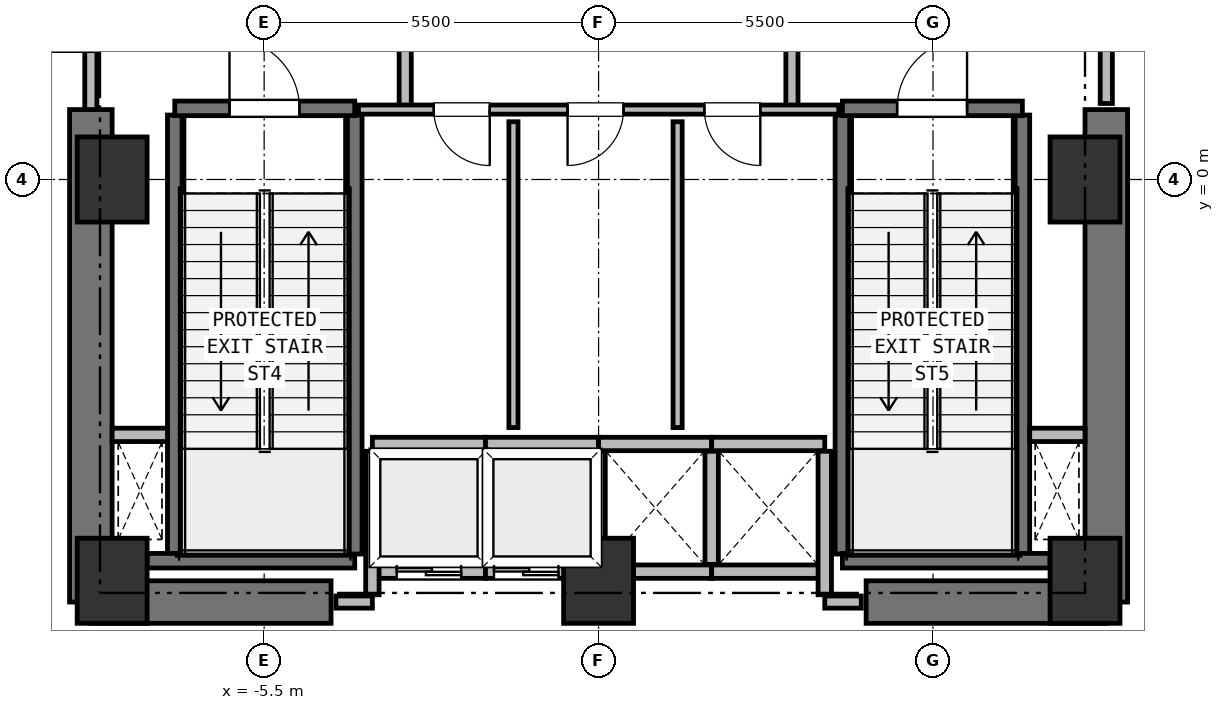
"""IFC4 building model, lengths in metres.
Left out: names, types, materials, properties, quantities, classifications, styles, units other than length and angle.
Written with IfcOpenShell. Run it as: python <this file> out.ifc"""

import sys

from ifc_helpers import new_model, si_unit, direction, frame, frame_2d, origin, origin_2d, place, context, subcontext, project, spatial, rectangle, extrude, element, fill, save


model = new_model("IFC4")
c1 = context("Model", 3, precision=1e-05, world=origin(), true_north=direction((0.0, 1.0)))
c2 = subcontext(c1, "Body", "Model", "MODEL_VIEW")
j1 = project(units=[si_unit("LENGTHUNIT", "METRE"), si_unit("PLANEANGLEUNIT", "RADIAN")], contexts=[c1])
p1 = place(None, origin())
s1 = spatial("IfcSite", under=j1, at=p1, CompositionType="ELEMENT")
p2 = place(p1, origin())
s2 = spatial("IfcBuilding", under=s1, at=p2, CompositionType="ELEMENT")
p3 = place(p2, frame((0.0, 0.0, 16.0)))
s3 = spatial("IfcBuildingStorey", under=s2, at=p3, CompositionType="ELEMENT", Elevation=16.0)
for number, where, z_axis, x_axis in (
    (1, (-8.0, -6.6, 0.0), (0.0, 0.0, 1.0), (1.0, 0.0, 0.0)),
    (2, (0.0, -6.6, 0.0), (0.0, 0.0, 1.0), (1.0, 0.0, 0.0)),
    (3, (8.0, -6.6, 0.0), (0.0, 0.0, 1.0), (1.0, 0.0, 0.0)),
    (4, (8.0, 0.0, 0.0), (0.0, 0.0, 1.0), (1.0, 0.0, 0.0)),
    (5, (-8.0, 0.0, 0.0), (0.0, 0.0, 1.0), (1.0, 0.0, 0.0)),
):
    element("IfcColumn", number, at=place(p3, frame(where, z_axis=z_axis, x_axis=x_axis)), inside=s3, PredefinedType="COLUMN", context=c2, shape_type="SweptSolid", body=[
        extrude(rectangle(XDim=1.15, YDim=1.4, at=origin_2d()), origin(), (0.0, 0.0, 1.0), 5.5),
    ])
for number, where, z_axis, x_axis in (
    (6, (-8.35, -6.95, 0.0), (0.0, 0.0, 1.0), (1.0, 0.0, 0.0)),
    (7, (4.4, -6.95, 0.0), (0.0, 0.0, 1.0), (1.0, 0.0, 0.0)),
):
    element("IfcWall", number, at=place(p3, frame(where, z_axis=z_axis, x_axis=x_axis)), inside=s3, PredefinedType="SHEAR", context=c2, shape_type="SweptSolid", body=[
        extrude(rectangle(XDim=3.95, YDim=0.7, at=frame_2d((1.975, 0.0))), origin(), (0.0, 0.0, 1.0), 5.22),
    ])
for number, where, z_axis, x_axis in (
    (8, (-8.35, -6.95, 0.0), (0.0, 0.0, 1.0), (0.0, 1.0, 0.0)),
    (9, (8.35, -6.95, 0.0), (0.0, 0.0, 1.0), (0.0, 1.0, 0.0)),
):
    element("IfcWall", number, at=place(p3, frame(where, z_axis=z_axis, x_axis=x_axis)), inside=s3, PredefinedType="SHEAR", context=c2, shape_type="SweptSolid", body=[
        extrude(rectangle(XDim=8.1, YDim=0.7, at=frame_2d((4.05, 0.0))), origin(), (0.0, 0.0, 1.0), 5.22),
    ])
p4 = place(p3, frame((-6.97, -6.16, 0.0), z_axis=(0.0, 0.0, 1.0), x_axis=(0.0, 1.0, 0.0)))
e10 = element("IfcWall", 10, at=p4, inside=s3, PredefinedType="SHEAR", context=c2, shape_type="SweptSolid", body=[
    extrude(rectangle(XDim=7.22, YDim=0.24, at=frame_2d((3.61, 0.0))), origin(), (0.0, 0.0, 1.0), 5.22),
])
p5 = place(p3, frame((-7.425, -6.27, 0.0), z_axis=(0.0, 0.0, 1.0), x_axis=(1.0, 0.0, 0.0)))
e11 = element("IfcWall", 11, at=p5, inside=s3, PredefinedType="SHEAR", context=c2, shape_type="SweptSolid", body=[
    extrude(rectangle(XDim=3.415, YDim=0.24, at=frame_2d((1.708, 0.0))), origin(), (0.0, 0.0, 1.0), 5.22),
])
p6 = place(p3, frame((-4.01, -6.16, 0.0), z_axis=(0.0, 0.0, 1.0), x_axis=(0.0, 1.0, 0.0)))
e12 = element("IfcWall", 12, at=p6, inside=s3, PredefinedType="SHEAR", context=c2, shape_type="SweptSolid", body=[
    extrude(rectangle(XDim=7.22, YDim=0.24, at=frame_2d((3.61, 0.0))), origin(), (0.0, 0.0, 1.0), 5.22),
])
p7 = place(p3, frame((-6.97, 1.17, 0.0), z_axis=(0.0, 0.0, 1.0), x_axis=(1.0, 0.0, 0.0)))
e13 = element("IfcWall", 13, at=p7, inside=s3, PredefinedType="SHEAR", context=c2, shape_type="SweptSolid", body=[
    extrude(rectangle(XDim=2.96, YDim=0.24, at=frame_2d((1.48, 0.0))), origin(), (0.0, 0.0, 1.0), 5.22),
])
p8 = place(p7, frame((0.9, 0.0, 0.0)))
e14 = element("IfcOpeningElement", 14, at=p8, cuts=e13, PredefinedType="OPENING", context=c2, shape_type="SweptSolid", body=[
    extrude(rectangle(XDim=1.15, YDim=2.15, at=frame_2d((0.575, 1.075))), frame((0.0, 0.13, 0.0), z_axis=(0.0, -1.0, 0.0), x_axis=(1.0, 0.0, 0.0)), (0.0, 0.0, 1.0), 0.26),
])
for number, where, z_axis, x_axis in (
    (15, (4.01, -6.16, 0.0), (0.0, 0.0, 1.0), (0.0, 1.0, 0.0)),
    (16, (6.97, -6.16, 0.0), (0.0, 0.0, 1.0), (0.0, 1.0, 0.0)),
):
    element("IfcWall", number, at=place(p3, frame(where, z_axis=z_axis, x_axis=x_axis)), inside=s3, PredefinedType="SHEAR", context=c2, shape_type="SweptSolid", body=[
        extrude(rectangle(XDim=7.22, YDim=0.24, at=frame_2d((3.61, 0.0))), origin(), (0.0, 0.0, 1.0), 5.22),
    ])
p9 = place(p3, frame((4.01, -6.27, 0.0), z_axis=(0.0, 0.0, 1.0), x_axis=(1.0, 0.0, 0.0)))
e17 = element("IfcWall", 17, at=p9, inside=s3, PredefinedType="SHEAR", context=c2, shape_type="SweptSolid", body=[
    extrude(rectangle(XDim=3.415, YDim=0.24, at=frame_2d((1.708, 0.0))), origin(), (0.0, 0.0, 1.0), 5.22),
])
p10 = place(p3, frame((4.01, 1.17, 0.0), z_axis=(0.0, 0.0, 1.0), x_axis=(1.0, 0.0, 0.0)))
e18 = element("IfcWall", 18, at=p10, inside=s3, PredefinedType="SHEAR", context=c2, shape_type="SweptSolid", body=[
    extrude(rectangle(XDim=2.96, YDim=0.24, at=frame_2d((1.48, 0.0))), origin(), (0.0, 0.0, 1.0), 5.22),
])
p11 = place(p10, frame((0.9, 0.0, 0.0)))
e19 = element("IfcOpeningElement", 19, at=p11, cuts=e18, PredefinedType="OPENING", context=c2, shape_type="SweptSolid", body=[
    extrude(rectangle(XDim=1.15, YDim=2.15, at=frame_2d((0.575, 1.075))), frame((0.0, 0.13, 0.0), z_axis=(0.0, -1.0, 0.0), x_axis=(1.0, 0.0, 0.0)), (0.0, 0.0, 1.0), 0.26),
])
for number, where, z_axis, x_axis in (
    (20, (-8.0, -4.2, 0.0), (0.0, 0.0, 1.0), (1.0, 0.0, 0.0)),
    (21, (7.09, -4.2, 0.0), (0.0, 0.0, 1.0), (1.0, 0.0, 0.0)),
):
    element("IfcWall", number, at=place(p3, frame(where, z_axis=z_axis, x_axis=x_axis)), inside=s3, PredefinedType="PARTITIONING", context=c2, shape_type="SweptSolid", body=[
        extrude(rectangle(XDim=0.91, YDim=0.22, at=frame_2d((0.455, 0.0))), origin(), (0.0, 0.0, 1.0), 5.22),
    ])
p12 = place(p3, frame((-3.72, -6.45, 0.0), z_axis=(0.0, 0.0, 1.0), x_axis=(1.0, 0.0, 0.0)))
e22 = element("IfcWall", 22, at=p12, inside=s3, PredefinedType="PARTITIONING", context=c2, shape_type="SweptSolid", body=[
    extrude(rectangle(XDim=1.86, YDim=0.22, at=frame_2d((0.93, 0.0))), origin(), (0.0, 0.0, 1.0), 4.8),
])
p13 = place(p12, frame((0.4, 0.0, 0.0)))
e23 = element("IfcOpeningElement", 23, at=p13, cuts=e22, PredefinedType="OPENING", context=c2, shape_type="SweptSolid", body=[
    extrude(rectangle(XDim=1.06, YDim=2.15, at=frame_2d((0.53, 1.075))), frame((0.0, 0.12, 0.0), z_axis=(0.0, -1.0, 0.0), x_axis=(1.0, 0.0, 0.0)), (0.0, 0.0, 1.0), 0.24),
])
p14 = place(p3, frame((-3.72, -4.35, 0.0), z_axis=(0.0, 0.0, 1.0), x_axis=(1.0, 0.0, 0.0)))
e24 = element("IfcWall", 24, at=p14, inside=s3, PredefinedType="PARTITIONING", context=c2, shape_type="SweptSolid", body=[
    extrude(rectangle(XDim=1.86, YDim=0.22, at=frame_2d((0.93, 0.0))), origin(), (0.0, 0.0, 1.0), 5.22),
])
p15 = place(p3, frame((-3.72, -6.83, 0.0), z_axis=(0.0, 0.0, 1.0), x_axis=(0.0, 1.0, 0.0)))
e25 = element("IfcWall", 25, at=p15, inside=s3, PredefinedType="PARTITIONING", context=c2, shape_type="SweptSolid", body=[
    extrude(rectangle(XDim=2.36, YDim=0.22, at=frame_2d((1.18, 0.0))), origin(), (0.0, 0.0, 1.0), 5.22),
])
p16 = place(p3, frame((-1.86, -6.33, 0.0), z_axis=(0.0, 0.0, 1.0), x_axis=(0.0, 1.0, 0.0)))
e26 = element("IfcWall", 26, at=p16, inside=s3, PredefinedType="PARTITIONING", context=c2, shape_type="SweptSolid", body=[
    extrude(rectangle(XDim=1.86, YDim=0.22, at=frame_2d((0.93, 0.0))), origin(), (0.0, 0.0, 1.0), 5.22),
])
p17 = place(p3, frame((-1.86, -6.45, 0.0), z_axis=(0.0, 0.0, 1.0), x_axis=(1.0, 0.0, 0.0)))
e27 = element("IfcWall", 27, at=p17, inside=s3, PredefinedType="PARTITIONING", context=c2, shape_type="SweptSolid", body=[
    extrude(rectangle(XDim=1.86, YDim=0.22, at=frame_2d((0.93, 0.0))), origin(), (0.0, 0.0, 1.0), 4.8),
])
p18 = place(p17, frame((0.14, 0.0, 0.0)))
e28 = element("IfcOpeningElement", 28, at=p18, cuts=e27, PredefinedType="OPENING", context=c2, shape_type="SweptSolid", body=[
    extrude(rectangle(XDim=1.06, YDim=2.15, at=frame_2d((0.53, 1.075))), frame((0.0, 0.12, 0.0), z_axis=(0.0, -1.0, 0.0), x_axis=(1.0, 0.0, 0.0)), (0.0, 0.0, 1.0), 0.24),
])
for number, where, z_axis, x_axis in (
    (29, (-1.86, -4.35, 0.0), (0.0, 0.0, 1.0), (1.0, 0.0, 0.0)),
    (30, (0.0, -6.33, 0.0), (0.0, 0.0, 1.0), (0.0, 1.0, 0.0)),
):
    element("IfcWall", number, at=place(p3, frame(where, z_axis=z_axis, x_axis=x_axis)), inside=s3, PredefinedType="PARTITIONING", context=c2, shape_type="SweptSolid", body=[
        extrude(rectangle(XDim=1.86, YDim=0.22, at=frame_2d((0.93, 0.0))), origin(), (0.0, 0.0, 1.0), 5.22),
    ])
p19 = place(p3, frame((0.0, -6.45, 0.0), z_axis=(0.0, 0.0, 1.0), x_axis=(1.0, 0.0, 0.0)))
e31 = element("IfcWall", 31, at=p19, inside=s3, PredefinedType="PARTITIONING", context=c2, shape_type="SweptSolid", body=[
    extrude(rectangle(XDim=1.86, YDim=0.22, at=frame_2d((0.93, 0.0))), origin(), (0.0, 0.0, 1.0), 4.8),
])
for number, where, z_axis, x_axis in (
    (32, (0.0, -4.35, 0.0), (0.0, 0.0, 1.0), (1.0, 0.0, 0.0)),
    (33, (1.86, -6.33, 0.0), (0.0, 0.0, 1.0), (0.0, 1.0, 0.0)),
):
    element("IfcWall", number, at=place(p3, frame(where, z_axis=z_axis, x_axis=x_axis)), inside=s3, PredefinedType="PARTITIONING", context=c2, shape_type="SweptSolid", body=[
        extrude(rectangle(XDim=1.86, YDim=0.22, at=frame_2d((0.93, 0.0))), origin(), (0.0, 0.0, 1.0), 5.22),
    ])
p20 = place(p3, frame((1.86, -6.45, 0.0), z_axis=(0.0, 0.0, 1.0), x_axis=(1.0, 0.0, 0.0)))
e34 = element("IfcWall", 34, at=p20, inside=s3, PredefinedType="PARTITIONING", context=c2, shape_type="SweptSolid", body=[
    extrude(rectangle(XDim=1.86, YDim=0.22, at=frame_2d((0.93, 0.0))), origin(), (0.0, 0.0, 1.0), 4.8),
])
p21 = place(p3, frame((1.86, -4.35, 0.0), z_axis=(0.0, 0.0, 1.0), x_axis=(1.0, 0.0, 0.0)))
e35 = element("IfcWall", 35, at=p21, inside=s3, PredefinedType="PARTITIONING", context=c2, shape_type="SweptSolid", body=[
    extrude(rectangle(XDim=1.86, YDim=0.22, at=frame_2d((0.93, 0.0))), origin(), (0.0, 0.0, 1.0), 5.22),
])
p22 = place(p3, frame((3.72, -6.83, 0.0), z_axis=(0.0, 0.0, 1.0), x_axis=(0.0, 1.0, 0.0)))
e36 = element("IfcWall", 36, at=p22, inside=s3, PredefinedType="PARTITIONING", context=c2, shape_type="SweptSolid", body=[
    extrude(rectangle(XDim=2.36, YDim=0.22, at=frame_2d((1.18, 0.0))), origin(), (0.0, 0.0, 1.0), 5.22),
])
p23 = place(p3, frame((-3.18, 1.15, 0.0), z_axis=(0.0, 0.0, 1.0), x_axis=(0.0, 1.0, 0.0)))
e37 = element("IfcWall", 37, at=p23, inside=s3, PredefinedType="PARTITIONING", context=c2, shape_type="SweptSolid", body=[
    extrude(rectangle(XDim=3.3, YDim=0.2, at=frame_2d((1.65, 0.0))), origin(), (0.0, 0.0, 1.0), 5.22),
])
p24 = place(p23, frame((1.08, 0.0, 0.0)))
e38 = element("IfcOpeningElement", 38, at=p24, cuts=e37, PredefinedType="OPENING", context=c2, shape_type="SweptSolid", body=[
    extrude(rectangle(XDim=1.15, YDim=2.15, at=frame_2d((0.575, 1.075))), frame((0.0, 0.11, 0.0), z_axis=(0.0, -1.0, 0.0), x_axis=(1.0, 0.0, 0.0)), (0.0, 0.0, 1.0), 0.22),
])
p25 = place(p3, frame((3.18, 1.15, 0.0), z_axis=(0.0, 0.0, 1.0), x_axis=(0.0, 1.0, 0.0)))
e39 = element("IfcWall", 39, at=p25, inside=s3, PredefinedType="PARTITIONING", context=c2, shape_type="SweptSolid", body=[
    extrude(rectangle(XDim=3.3, YDim=0.2, at=frame_2d((1.65, 0.0))), origin(), (0.0, 0.0, 1.0), 5.22),
])
p26 = place(p25, frame((1.08, 0.0, 0.0)))
e40 = element("IfcOpeningElement", 40, at=p26, cuts=e39, PredefinedType="OPENING", context=c2, shape_type="SweptSolid", body=[
    extrude(rectangle(XDim=1.15, YDim=2.15, at=frame_2d((0.575, 1.075))), frame((0.0, 0.11, 0.0), z_axis=(0.0, -1.0, 0.0), x_axis=(1.0, 0.0, 0.0)), (0.0, 0.0, 1.0), 0.22),
])
p27 = place(p3, frame((-8.35, 1.15, 0.0), z_axis=(0.0, 0.0, 1.0), x_axis=(0.0, 1.0, 0.0)))
e41 = element("IfcWall", 41, at=p27, inside=s3, PredefinedType="PARTITIONING", context=c2, shape_type="SweptSolid", body=[
    extrude(rectangle(XDim=5.4, YDim=0.2, at=frame_2d((2.7, 0.0))), origin(), (0.0, 0.0, 1.0), 5.22),
])
p28 = place(p27, frame((0.95, 0.0, 0.0)))
e42 = element("IfcOpeningElement", 42, at=p28, cuts=e41, PredefinedType="OPENING", context=c2, shape_type="SweptSolid", body=[
    extrude(rectangle(XDim=1.15, YDim=2.15, at=frame_2d((0.575, 1.075))), frame((0.0, 0.11, 0.0), z_axis=(0.0, -1.0, 0.0), x_axis=(1.0, 0.0, 0.0)), (0.0, 0.0, 1.0), 0.22),
])
p29 = place(p3, frame((8.35, 1.25, 0.0), z_axis=(0.0, 0.0, 1.0), x_axis=(0.0, 1.0, 0.0)))
e43 = element("IfcWall", 43, at=p29, inside=s3, PredefinedType="PARTITIONING", context=c2, shape_type="SweptSolid", body=[
    extrude(rectangle(XDim=5.3, YDim=0.2, at=frame_2d((2.65, 0.0))), origin(), (0.0, 0.0, 1.0), 5.22),
])
p30 = place(p29, frame((0.95, 0.0, 0.0)))
e44 = element("IfcOpeningElement", 44, at=p30, cuts=e43, PredefinedType="OPENING", context=c2, shape_type="SweptSolid", body=[
    extrude(rectangle(XDim=1.15, YDim=2.15, at=frame_2d((0.575, 1.075))), frame((0.0, 0.11, 0.0), z_axis=(0.0, -1.0, 0.0), x_axis=(1.0, 0.0, 0.0)), (0.0, 0.0, 1.0), 0.22),
])
p31 = place(p3, frame((3.95, 1.15, 0.0), z_axis=(0.0, 0.0, 1.0), x_axis=(-1.0, 0.0, 0.0)))
e45 = element("IfcWall", 45, at=p31, inside=s3, PredefinedType="PARTITIONING", context=c2, shape_type="SweptSolid", body=[
    extrude(rectangle(XDim=7.9, YDim=0.15, at=frame_2d((3.95, 0.0))), origin(), (0.0, 0.0, 1.0), 5.22),
])
p32 = place(p31, frame((5.74, 0.0, 0.0)))
e46 = element("IfcOpeningElement", 46, at=p32, cuts=e45, PredefinedType="OPENING", context=c2, shape_type="SweptSolid", body=[
    extrude(rectangle(XDim=0.92, YDim=2.05, at=frame_2d((0.46, 1.025))), frame((0.0, 0.085, 0.0), z_axis=(0.0, -1.0, 0.0), x_axis=(1.0, 0.0, 0.0)), (0.0, 0.0, 1.0), 0.17),
])
p33 = place(p31, frame((3.54, 0.0, 0.0)))
e47 = element("IfcOpeningElement", 47, at=p33, cuts=e45, PredefinedType="OPENING", context=c2, shape_type="SweptSolid", body=[
    extrude(rectangle(XDim=0.92, YDim=2.05, at=frame_2d((0.46, 1.025))), frame((0.0, 0.085, 0.0), z_axis=(0.0, -1.0, 0.0), x_axis=(1.0, 0.0, 0.0)), (0.0, 0.0, 1.0), 0.17),
])
p34 = place(p31, frame((1.29, 0.0, 0.0)))
e48 = element("IfcOpeningElement", 48, at=p34, cuts=e45, PredefinedType="OPENING", context=c2, shape_type="SweptSolid", body=[
    extrude(rectangle(XDim=0.92, YDim=2.05, at=frame_2d((0.46, 1.025))), frame((0.0, 0.085, 0.0), z_axis=(0.0, -1.0, 0.0), x_axis=(1.0, 0.0, 0.0)), (0.0, 0.0, 1.0), 0.17),
])
for number, where, z_axis, x_axis in (
    (49, (-4.32, -6.95, 0.0), (0.0, 0.0, 1.0), (1.0, 0.0, 0.0)),
    (50, (3.72, -6.95, 0.0), (0.0, 0.0, 1.0), (1.0, 0.0, 0.0)),
):
    element("IfcWall", number, at=place(p3, frame(where, z_axis=z_axis, x_axis=x_axis)), inside=s3, PredefinedType="PARTITIONING", context=c2, shape_type="SweptSolid", body=[
        extrude(rectangle(XDim=0.6, YDim=0.2, at=frame_2d((0.3, 0.0))), origin(), (0.0, 0.0, 1.0), 5.22),
    ])
for number, where, z_axis, x_axis in (
    (51, (-1.4, -4.08, 0.0), (0.0, 0.0, 1.0), (0.0, 1.0, 0.0)),
    (52, (1.3, -4.08, 0.0), (0.0, 0.0, 1.0), (0.0, 1.0, 0.0)),
):
    element("IfcWall", number, at=place(p3, frame(where, z_axis=z_axis, x_axis=x_axis)), inside=s3, PredefinedType="PARTITIONING", context=c2, shape_type="SweptSolid", body=[
        extrude(rectangle(XDim=5.03, YDim=0.15, at=frame_2d((2.515, 0.0))), origin(), (0.0, 0.0, 1.0), 5.22),
    ])
p35 = place(p8, origin())
e53 = element("IfcDoor", 53, at=p35, inside=s3, OperationType="SINGLE_SWING_LEFT", PredefinedType="DOOR", context=c2, shape_type="SweptSolid", body=[
    extrude(rectangle(XDim=1.15, YDim=2.15, at=frame_2d((0.575, 1.075))), frame((0.0, 0.025, 0.0), z_axis=(0.0, -1.0, 0.0), x_axis=(1.0, 0.0, 0.0)), (0.0, 0.0, 1.0), 0.05),
])
fill(e14, e53)
p36 = place(p11, origin())
e54 = element("IfcDoor", 54, at=p36, inside=s3, OperationType="SINGLE_SWING_RIGHT", PredefinedType="DOOR", context=c2, shape_type="SweptSolid", body=[
    extrude(rectangle(XDim=1.15, YDim=2.15, at=frame_2d((0.575, 1.075))), frame((0.0, 0.025, 0.0), z_axis=(0.0, -1.0, 0.0), x_axis=(1.0, 0.0, 0.0)), (0.0, 0.0, 1.0), 0.05),
])
fill(e19, e54)
p37 = place(p13, origin())
e55 = element("IfcDoor", 55, at=p37, inside=s3, OperationType="DOUBLE_DOOR_SLIDING", PredefinedType="DOOR", context=c2, shape_type="SweptSolid", body=[
    extrude(rectangle(XDim=1.06, YDim=2.15, at=frame_2d((0.53, 1.075))), frame((0.0, 0.025, 0.0), z_axis=(0.0, -1.0, 0.0), x_axis=(1.0, 0.0, 0.0)), (0.0, 0.0, 1.0), 0.05),
])
fill(e23, e55)
p38 = place(p18, origin())
e56 = element("IfcDoor", 56, at=p38, inside=s3, OperationType="DOUBLE_DOOR_SLIDING", PredefinedType="DOOR", context=c2, shape_type="SweptSolid", body=[
    extrude(rectangle(XDim=1.06, YDim=2.15, at=frame_2d((0.53, 1.075))), frame((0.0, 0.025, 0.0), z_axis=(0.0, -1.0, 0.0), x_axis=(1.0, 0.0, 0.0)), (0.0, 0.0, 1.0), 0.05),
])
fill(e28, e56)
p39 = place(p28, origin())
e57 = element("IfcDoor", 57, at=p39, inside=s3, OperationType="SINGLE_SWING_LEFT", PredefinedType="DOOR", context=c2, shape_type="SweptSolid", body=[
    extrude(rectangle(XDim=1.15, YDim=2.15, at=frame_2d((0.575, 1.075))), frame((0.0, 0.025, 0.0), z_axis=(0.0, -1.0, 0.0), x_axis=(1.0, 0.0, 0.0)), (0.0, 0.0, 1.0), 0.05),
])
fill(e42, e57)
p40 = place(p32, origin())
e58 = element("IfcDoor", 58, at=p40, inside=s3, OperationType="SINGLE_SWING_LEFT", PredefinedType="DOOR", context=c2, shape_type="SweptSolid", body=[
    extrude(rectangle(XDim=0.92, YDim=2.05, at=frame_2d((0.46, 1.025))), frame((0.0, 0.025, 0.0), z_axis=(0.0, -1.0, 0.0), x_axis=(1.0, 0.0, 0.0)), (0.0, 0.0, 1.0), 0.05),
])
fill(e46, e58)
p41 = place(p33, origin())
e59 = element("IfcDoor", 59, at=p41, inside=s3, OperationType="SINGLE_SWING_RIGHT", PredefinedType="DOOR", context=c2, shape_type="SweptSolid", body=[
    extrude(rectangle(XDim=0.92, YDim=2.05, at=frame_2d((0.46, 1.025))), frame((0.0, 0.025, 0.0), z_axis=(0.0, -1.0, 0.0), x_axis=(1.0, 0.0, 0.0)), (0.0, 0.0, 1.0), 0.05),
])
fill(e47, e59)
p42 = place(p34, origin())
e60 = element("IfcDoor", 60, at=p42, inside=s3, OperationType="SINGLE_SWING_LEFT", PredefinedType="DOOR", context=c2, shape_type="SweptSolid", body=[
    extrude(rectangle(XDim=0.92, YDim=2.05, at=frame_2d((0.46, 1.025))), frame((0.0, 0.025, 0.0), z_axis=(0.0, -1.0, 0.0), x_axis=(1.0, 0.0, 0.0)), (0.0, 0.0, 1.0), 0.05),
])
fill(e48, e60)
save(model, sys.argv[1])
